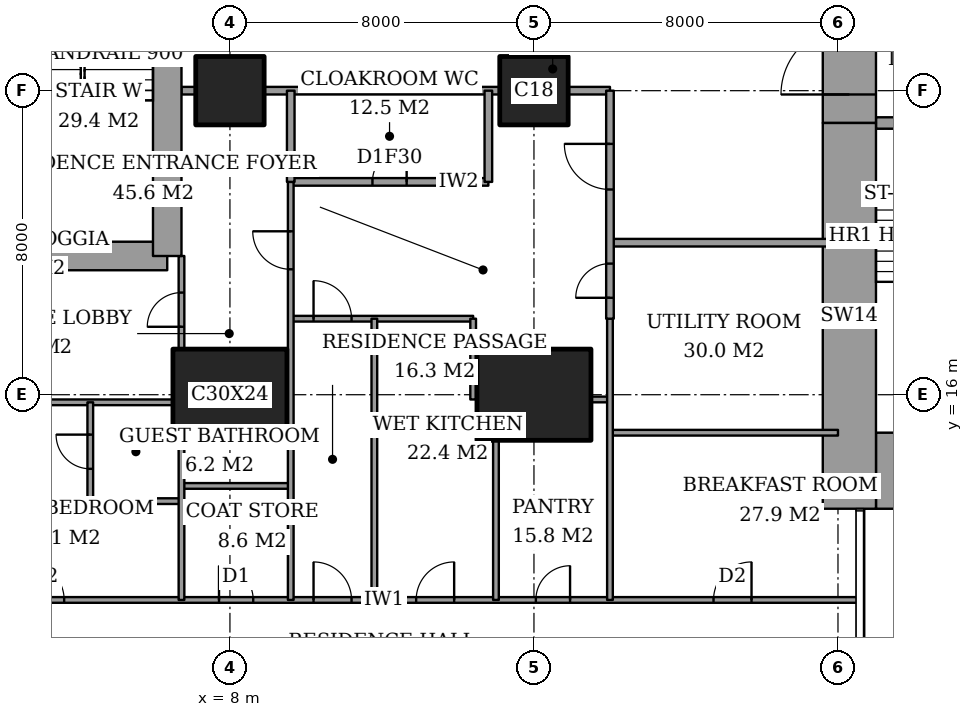
"""IFC4 building model, lengths in metres.
Left out: names, types, materials, properties, quantities, classifications, styles, units other than length and angle.
Written with IfcOpenShell. Run it as: python <this file> out.ifc"""

import sys

from ifc_helpers import new_model, si_unit, direction, frame, frame_2d, origin, origin_2d, place, context, subcontext, project, spatial, rectangle, extrude, element, fill, save


model = new_model("IFC4")
c1 = context("Model", 3, precision=1e-05, world=origin(), true_north=direction((0.0, 1.0)))
c2 = subcontext(c1, "Body", "Model", "MODEL_VIEW")
j1 = project(units=[si_unit("LENGTHUNIT", "METRE"), si_unit("PLANEANGLEUNIT", "RADIAN")], contexts=[c1])
p1 = place(None, origin())
s1 = spatial("IfcSite", under=j1, at=p1, CompositionType="ELEMENT")
p2 = place(p1, origin())
s2 = spatial("IfcBuilding", under=s1, at=p2, CompositionType="ELEMENT")
p3 = place(p2, frame((0.0, 0.0, 185.8)))
s3 = spatial("IfcBuildingStorey", under=s2, at=p3, CompositionType="ELEMENT", Elevation=185.8)
p4 = place(p3, frame((8.0, 16.0, 0.0), z_axis=(0.0, 0.0, 1.0), x_axis=(1.0, 0.0, 0.0)))
e1 = element("IfcColumn", 1, at=p4, inside=s3, PredefinedType="COLUMN", context=c2, shape_type="SweptSolid", body=[
    extrude(rectangle(XDim=3.0, YDim=2.4, at=origin_2d()), origin(), (0.0, 0.0, 1.0), 3.6),
])
p5 = place(p3, frame((8.0, 24.0, 0.0), z_axis=(0.0, 0.0, 1.0), x_axis=(1.0, 0.0, 0.0)))
e2 = element("IfcColumn", 2, at=p5, inside=s3, PredefinedType="COLUMN", context=c2, shape_type="SweptSolid", body=[
    extrude(rectangle(XDim=1.8, YDim=1.8, at=origin_2d()), origin(), (0.0, 0.0, 1.0), 3.6),
])
p6 = place(p3, frame((16.0, 16.0, 0.0), z_axis=(0.0, 0.0, 1.0), x_axis=(1.0, 0.0, 0.0)))
e3 = element("IfcColumn", 3, at=p6, inside=s3, PredefinedType="COLUMN", context=c2, shape_type="SweptSolid", body=[
    extrude(rectangle(XDim=3.0, YDim=2.4, at=origin_2d()), origin(), (0.0, 0.0, 1.0), 3.6),
])
p7 = place(p3, frame((16.0, 24.0, 0.0), z_axis=(0.0, 0.0, 1.0), x_axis=(1.0, 0.0, 0.0)))
e4 = element("IfcColumn", 4, at=p7, inside=s3, PredefinedType="COLUMN", context=c2, shape_type="SweptSolid", body=[
    extrude(rectangle(XDim=1.8, YDim=1.8, at=origin_2d()), origin(), (0.0, 0.0, 1.0), 3.6),
])
p8 = place(p3, frame((25.0, 14.0, 0.0), z_axis=(0.0, 0.0, 1.0), x_axis=(1.0, 0.0, 0.0)))
e5 = element("IfcWall", 5, at=p8, inside=s3, PredefinedType="SHEAR", context=c2, shape_type="SweptSolid", body=[
    extrude(rectangle(XDim=3.15, YDim=2.0, at=frame_2d((1.575, 0.0))), origin(), (0.0, 0.0, 1.0), 3.6),
])
p9 = place(p3, frame((24.3, 13.0, 0.0), z_axis=(0.0, 0.0, 1.0), x_axis=(0.0, 1.0, 0.0)))
e6 = element("IfcWall", 6, at=p9, inside=s3, PredefinedType="SHEAR", context=c2, shape_type="SweptSolid", body=[
    extrude(rectangle(XDim=10.15, YDim=1.4, at=frame_2d((5.075, 0.0))), origin(), (0.0, 0.0, 1.0), 3.6),
])
p10 = place(p3, frame((24.3, 23.15, 0.0), z_axis=(0.0, 0.0, 1.0), x_axis=(0.0, 1.0, 0.0)))
e7 = element("IfcWall", 7, at=p10, inside=s3, PredefinedType="SHEAR", context=c2, shape_type="SweptSolid", body=[
    extrude(rectangle(XDim=11.85, YDim=1.4, at=frame_2d((5.925, 0.0))), origin(), (0.0, 0.0, 1.0), 3.6),
])
p11 = place(p10, frame((0.75, 0.0, 0.0)))
e8 = element("IfcOpeningElement", 8, at=p11, cuts=e7, PredefinedType="OPENING", context=c2, shape_type="SweptSolid", body=[
    extrude(rectangle(XDim=1.8, YDim=2.4, at=frame_2d((0.9, 1.2))), frame((0.0, 0.71, 0.0), z_axis=(0.0, -1.0, 0.0), x_axis=(1.0, 0.0, 0.0)), (0.0, 0.0, 1.0), 1.42),
])
p12 = place(p3, frame((25.0, 23.15, 0.0), z_axis=(0.0, 0.0, 1.0), x_axis=(1.0, 0.0, 0.0)))
e9 = element("IfcWall", 9, at=p12, inside=s3, PredefinedType="SHEAR", context=c2, shape_type="SweptSolid", body=[
    extrude(rectangle(XDim=3.15, YDim=0.3, at=frame_2d((1.575, 0.0))), origin(), (0.0, 0.0, 1.0), 3.6),
])
p13 = place(p12, frame((0.6, 0.0, 0.0)))
e10 = element("IfcOpeningElement", 10, at=p13, cuts=e9, PredefinedType="OPENING", context=c2, shape_type="SweptSolid", body=[
    extrude(rectangle(XDim=1.0, YDim=2.1, at=frame_2d((0.5, 1.05))), frame((0.0, 0.16, 0.0), z_axis=(0.0, -1.0, 0.0), x_axis=(1.0, 0.0, 0.0)), (0.0, 0.0, 1.0), 0.32),
])
p14 = place(p3, frame((1.9, 19.65, 0.0), z_axis=(0.0, 0.0, 1.0), x_axis=(1.0, 0.0, 0.0)))
e11 = element("IfcWall", 11, at=p14, inside=s3, PredefinedType="SHEAR", context=c2, shape_type="SweptSolid", body=[
    extrude(rectangle(XDim=4.45, YDim=0.75, at=frame_2d((2.225, 0.0))), origin(), (0.0, 0.0, 1.0), 3.6),
])
p15 = place(p3, frame((6.35, 19.65, 0.0), z_axis=(0.0, 0.0, 1.0), x_axis=(0.0, 1.0, 0.0)))
e12 = element("IfcWall", 12, at=p15, inside=s3, PredefinedType="SHEAR", context=c2, shape_type="SweptSolid", body=[
    extrude(rectangle(XDim=8.7, YDim=0.75, at=frame_2d((4.35, 0.0))), origin(), (0.0, 0.0, 1.0), 3.6),
])
p16 = place(p15, frame((6.725, 0.0, 0.0)))
e13 = element("IfcOpeningElement", 13, at=p16, cuts=e12, PredefinedType="OPENING", context=c2, shape_type="SweptSolid", body=[
    extrude(rectangle(XDim=1.0, YDim=2.1, at=frame_2d((0.5, 1.05))), frame((0.0, 0.385, 0.0), z_axis=(0.0, -1.0, 0.0), x_axis=(1.0, 0.0, 0.0)), (0.0, 0.0, 1.0), 0.77),
])
p17 = place(p3, frame((-0.45, 10.6, 0.0), z_axis=(0.0, 0.0, 1.0), x_axis=(1.0, 0.0, 0.0)))
e14 = element("IfcWall", 14, at=p17, inside=s3, PredefinedType="PARTITIONING", context=c2, shape_type="SweptSolid", body=[
    extrude(rectangle(XDim=25.011, YDim=0.15, at=frame_2d((12.505, 0.0))), origin(), (0.0, 0.0, 1.0), 3.35),
])
p18 = place(p17, frame((10.65, 0.0, 0.0)))
e15 = element("IfcOpeningElement", 15, at=p18, cuts=e14, PredefinedType="OPENING", context=c2, shape_type="SweptSolid", body=[
    extrude(rectangle(XDim=1.0, YDim=2.1, at=frame_2d((0.5, 1.05))), frame((0.0, 0.085, 0.0), z_axis=(0.0, -1.0, 0.0), x_axis=(1.0, 0.0, 0.0)), (0.0, 0.0, 1.0), 0.17),
])
p19 = place(p17, frame((3.087, 0.0, 0.0)))
e16 = element("IfcOpeningElement", 16, at=p19, cuts=e14, PredefinedType="OPENING", context=c2, shape_type="SweptSolid", body=[
    extrude(rectangle(XDim=1.0, YDim=2.1, at=frame_2d((0.5, 1.05))), frame((0.0, 0.085, 0.0), z_axis=(0.0, -1.0, 0.0), x_axis=(1.0, 0.0, 0.0)), (0.0, 0.0, 1.0), 0.17),
])
p20 = place(p17, frame((8.163, 0.0, 0.0)))
e17 = element("IfcOpeningElement", 17, at=p20, cuts=e14, PredefinedType="OPENING", context=c2, shape_type="SweptSolid", body=[
    extrude(rectangle(XDim=0.9, YDim=2.1, at=frame_2d((0.45, 1.05))), frame((0.0, 0.085, 0.0), z_axis=(0.0, -1.0, 0.0), x_axis=(1.0, 0.0, 0.0)), (0.0, 0.0, 1.0), 0.17),
])
p21 = place(p17, frame((13.35, 0.0, 0.0)))
e18 = element("IfcOpeningElement", 18, at=p21, cuts=e14, PredefinedType="OPENING", context=c2, shape_type="SweptSolid", body=[
    extrude(rectangle(XDim=1.0, YDim=2.1, at=frame_2d((0.5, 1.05))), frame((0.0, 0.085, 0.0), z_axis=(0.0, -1.0, 0.0), x_axis=(1.0, 0.0, 0.0)), (0.0, 0.0, 1.0), 0.17),
])
p22 = place(p17, frame((16.5, 0.0, 0.0)))
e19 = element("IfcOpeningElement", 19, at=p22, cuts=e14, PredefinedType="OPENING", context=c2, shape_type="SweptSolid", body=[
    extrude(rectangle(XDim=0.9, YDim=2.1, at=frame_2d((0.45, 1.05))), frame((0.0, 0.085, 0.0), z_axis=(0.0, -1.0, 0.0), x_axis=(1.0, 0.0, 0.0)), (0.0, 0.0, 1.0), 0.17),
])
p23 = place(p17, frame((21.175, 0.0, 0.0)))
e20 = element("IfcOpeningElement", 20, at=p23, cuts=e14, PredefinedType="OPENING", context=c2, shape_type="SweptSolid", body=[
    extrude(rectangle(XDim=1.0, YDim=2.1, at=frame_2d((0.5, 1.05))), frame((0.0, 0.085, 0.0), z_axis=(0.0, -1.0, 0.0), x_axis=(1.0, 0.0, 0.0)), (0.0, 0.0, 1.0), 0.17),
])
p24 = place(p3, frame((4.325, 13.2, 0.0), z_axis=(0.0, 0.0, 1.0), x_axis=(1.0, 0.0, 0.0)))
e21 = element("IfcWall", 21, at=p24, inside=s3, PredefinedType="PARTITIONING", context=c2, shape_type="SweptSolid", body=[
    extrude(rectangle(XDim=2.4, YDim=0.15, at=frame_2d((1.2, 0.0))), origin(), (0.0, 0.0, 1.0), 3.35),
])
p25 = place(p3, frame((6.725, 13.6, 0.0), z_axis=(0.0, 0.0, 1.0), x_axis=(1.0, 0.0, 0.0)))
e22 = element("IfcWall", 22, at=p25, inside=s3, PredefinedType="PARTITIONING", context=c2, shape_type="SweptSolid", body=[
    extrude(rectangle(XDim=2.875, YDim=0.15, at=frame_2d((1.438, 0.0))), origin(), (0.0, 0.0, 1.0), 3.35),
])
p26 = place(p3, frame((18.0, 15.0, 0.0), z_axis=(0.0, 0.0, 1.0), x_axis=(1.0, 0.0, 0.0)))
e23 = element("IfcWall", 23, at=p26, inside=s3, PredefinedType="PARTITIONING", context=c2, shape_type="SweptSolid", body=[
    extrude(rectangle(XDim=6.0, YDim=0.15, at=frame_2d((3.0, 0.0))), origin(), (0.0, 0.0, 1.0), 3.35),
])
p27 = place(p3, frame((1.25, 15.8, 0.0), z_axis=(0.0, 0.0, 1.0), x_axis=(1.0, 0.0, 0.0)))
e24 = element("IfcWall", 24, at=p27, inside=s3, PredefinedType="PARTITIONING", context=c2, shape_type="SweptSolid", body=[
    extrude(rectangle(XDim=5.25, YDim=0.15, at=frame_2d((2.625, 0.0))), origin(), (0.0, 0.0, 1.0), 3.35),
])
p28 = place(p3, frame((17.5, 15.875, 0.0), z_axis=(0.0, 0.0, 1.0), x_axis=(1.0, 0.0, 0.0)))
e25 = element("IfcWall", 25, at=p28, inside=s3, PredefinedType="PARTITIONING", context=c2, shape_type="SweptSolid", body=[
    extrude(rectangle(XDim=0.5, YDim=0.15, at=frame_2d((0.25, 0.0))), origin(), (0.0, 0.0, 1.0), 2.634),
])
p29 = place(p3, frame((9.6, 18.0, 0.0), z_axis=(0.0, 0.0, 1.0), x_axis=(1.0, 0.0, 0.0)))
e26 = element("IfcWall", 26, at=p29, inside=s3, PredefinedType="PARTITIONING", context=c2, shape_type="SweptSolid", body=[
    extrude(rectangle(XDim=4.8, YDim=0.15, at=frame_2d((2.4, 0.0))), origin(), (0.0, 0.0, 1.0), 3.35),
])
p30 = place(p29, frame((0.6, 0.0, 0.0)))
e27 = element("IfcOpeningElement", 27, at=p30, cuts=e26, PredefinedType="OPENING", context=c2, shape_type="SweptSolid", body=[
    extrude(rectangle(XDim=1.0, YDim=2.1, at=frame_2d((0.5, 1.05))), frame((0.0, 0.085, 0.0), z_axis=(0.0, -1.0, 0.0), x_axis=(1.0, 0.0, 0.0)), (0.0, 0.0, 1.0), 0.17),
])
p31 = place(p3, frame((18.0, 20.0, 0.0), z_axis=(0.0, 0.0, 1.0), x_axis=(1.0, 0.0, 0.0)))
e28 = element("IfcWall", 28, at=p31, inside=s3, PredefinedType="PARTITIONING", context=c2, shape_type="SweptSolid", body=[
    extrude(rectangle(XDim=6.0, YDim=0.2, at=frame_2d((3.0, 0.0))), origin(), (0.0, 0.0, 1.0), 3.35),
])
p32 = place(p3, frame((9.6, 21.6, 0.0), z_axis=(0.0, 0.0, 1.0), x_axis=(1.0, 0.0, 0.0)))
e29 = element("IfcWall", 29, at=p32, inside=s3, PredefinedType="PARTITIONING", context=c2, shape_type="SweptSolid", body=[
    extrude(rectangle(XDim=5.2, YDim=0.2, at=frame_2d((2.6, 0.0))), origin(), (0.0, 0.0, 1.0), 3.35),
])
p33 = place(p32, frame((2.15, 0.0, 0.0)))
e30 = element("IfcOpeningElement", 30, at=p33, cuts=e29, PredefinedType="OPENING", context=c2, shape_type="SweptSolid", body=[
    extrude(rectangle(XDim=0.9, YDim=2.1, at=frame_2d((0.45, 1.05))), frame((0.0, 0.11, 0.0), z_axis=(0.0, -1.0, 0.0), x_axis=(1.0, 0.0, 0.0)), (0.0, 0.0, 1.0), 0.22),
])
p34 = place(p3, frame((6.725, 24.0, 0.0), z_axis=(0.0, 0.0, 1.0), x_axis=(1.0, 0.0, 0.0)))
e31 = element("IfcWall", 31, at=p34, inside=s3, PredefinedType="PARTITIONING", context=c2, shape_type="SweptSolid", body=[
    extrude(rectangle(XDim=0.375, YDim=0.2, at=frame_2d((0.188, 0.0))), origin(), (0.0, 0.0, 1.0), 3.35),
])
p35 = place(p3, frame((8.9, 24.0, 0.0), z_axis=(0.0, 0.0, 1.0), x_axis=(1.0, 0.0, 0.0)))
e32 = element("IfcWall", 32, at=p35, inside=s3, PredefinedType="PARTITIONING", context=c2, shape_type="SweptSolid", body=[
    extrude(rectangle(XDim=6.2, YDim=0.2, at=frame_2d((3.1, 0.0))), origin(), (0.0, 0.0, 1.0), 3.35),
])
p36 = place(p3, frame((16.9, 24.0, 0.0), z_axis=(0.0, 0.0, 1.0), x_axis=(1.0, 0.0, 0.0)))
e33 = element("IfcWall", 33, at=p36, inside=s3, PredefinedType="PARTITIONING", context=c2, shape_type="SweptSolid", body=[
    extrude(rectangle(XDim=1.1, YDim=0.2, at=frame_2d((0.55, 0.0))), origin(), (0.0, 0.0, 1.0), 3.35),
])
p37 = place(p3, frame((4.325, 13.2, 0.0), z_axis=(0.0, 0.0, 1.0), x_axis=(0.0, 1.0, 0.0)))
e34 = element("IfcWall", 34, at=p37, inside=s3, PredefinedType="PARTITIONING", context=c2, shape_type="SweptSolid", body=[
    extrude(rectangle(XDim=2.6, YDim=0.15, at=frame_2d((1.3, 0.0))), origin(), (0.0, 0.0, 1.0), 3.35),
])
p38 = place(p37, frame((0.85, 0.0, 0.0)))
e35 = element("IfcOpeningElement", 35, at=p38, cuts=e34, PredefinedType="OPENING", context=c2, shape_type="SweptSolid", body=[
    extrude(rectangle(XDim=0.9, YDim=2.1, at=frame_2d((0.45, 1.05))), frame((0.0, 0.085, 0.0), z_axis=(0.0, -1.0, 0.0), x_axis=(1.0, 0.0, 0.0)), (0.0, 0.0, 1.0), 0.17),
])
p39 = place(p3, frame((6.725, 10.6, 0.0), z_axis=(0.0, 0.0, 1.0), x_axis=(0.0, 1.0, 0.0)))
e36 = element("IfcWall", 36, at=p39, inside=s3, PredefinedType="PARTITIONING", context=c2, shape_type="SweptSolid", body=[
    extrude(rectangle(XDim=4.2, YDim=0.15, at=frame_2d((2.1, 0.0))), origin(), (0.0, 0.0, 1.0), 3.35),
])
p40 = place(p3, frame((6.725, 17.2, 0.0), z_axis=(0.0, 0.0, 1.0), x_axis=(0.0, 1.0, 0.0)))
e37 = element("IfcWall", 37, at=p40, inside=s3, PredefinedType="PARTITIONING", context=c2, shape_type="SweptSolid", body=[
    extrude(rectangle(XDim=2.45, YDim=0.15, at=frame_2d((1.225, 0.0))), origin(), (0.0, 0.0, 1.0), 3.35),
])
p41 = place(p40, frame((0.587, 0.0, 0.0)))
e38 = element("IfcOpeningElement", 38, at=p41, cuts=e37, PredefinedType="OPENING", context=c2, shape_type="SweptSolid", body=[
    extrude(rectangle(XDim=0.9, YDim=2.1, at=frame_2d((0.45, 1.05))), frame((0.0, 0.085, 0.0), z_axis=(0.0, -1.0, 0.0), x_axis=(1.0, 0.0, 0.0)), (0.0, 0.0, 1.0), 0.17),
])
p42 = place(p3, frame((9.6, 21.6, 0.0), z_axis=(0.0, 0.0, 1.0), x_axis=(0.0, 1.0, 0.0)))
e39 = element("IfcWall", 39, at=p42, inside=s3, PredefinedType="PARTITIONING", context=c2, shape_type="SweptSolid", body=[
    extrude(rectangle(XDim=2.4, YDim=0.2, at=frame_2d((1.2, 0.0))), origin(), (0.0, 0.0, 1.0), 3.35),
])
p43 = place(p3, frame((9.6, 10.6, 0.0), z_axis=(0.0, 0.0, 1.0), x_axis=(0.0, 1.0, 0.0)))
e40 = element("IfcWall", 40, at=p43, inside=s3, PredefinedType="PARTITIONING", context=c2, shape_type="SweptSolid", body=[
    extrude(rectangle(XDim=11.0, YDim=0.15, at=frame_2d((5.5, 0.0))), origin(), (0.0, 0.0, 1.0), 3.35),
])
p44 = place(p43, frame((8.7, 0.0, 0.0)))
e41 = element("IfcOpeningElement", 41, at=p44, cuts=e40, PredefinedType="OPENING", context=c2, shape_type="SweptSolid", body=[
    extrude(rectangle(XDim=1.0, YDim=2.1, at=frame_2d((0.5, 1.05))), frame((0.0, 0.085, 0.0), z_axis=(0.0, -1.0, 0.0), x_axis=(1.0, 0.0, 0.0)), (0.0, 0.0, 1.0), 0.17),
])
p45 = place(p3, frame((11.8, 10.6, 0.0), z_axis=(0.0, 0.0, 1.0), x_axis=(0.0, 1.0, 0.0)))
e42 = element("IfcWall", 42, at=p45, inside=s3, PredefinedType="PARTITIONING", context=c2, shape_type="SweptSolid", body=[
    extrude(rectangle(XDim=7.4, YDim=0.15, at=frame_2d((3.7, 0.0))), origin(), (0.0, 0.0, 1.0), 3.35),
])
p46 = place(p3, frame((14.4, 15.875, 0.0), z_axis=(0.0, 0.0, 1.0), x_axis=(0.0, 1.0, 0.0)))
e43 = element("IfcWall", 43, at=p46, inside=s3, PredefinedType="PARTITIONING", context=c2, shape_type="SweptSolid", body=[
    extrude(rectangle(XDim=2.125, YDim=0.15, at=frame_2d((1.062, 0.0))), origin(), (0.0, 0.0, 1.0), 3.35),
])
p47 = place(p3, frame((14.8, 21.6, 0.0), z_axis=(0.0, 0.0, 1.0), x_axis=(0.0, 1.0, 0.0)))
e44 = element("IfcWall", 44, at=p47, inside=s3, PredefinedType="PARTITIONING", context=c2, shape_type="SweptSolid", body=[
    extrude(rectangle(XDim=2.4, YDim=0.2, at=frame_2d((1.2, 0.0))), origin(), (0.0, 0.0, 1.0), 3.35),
])
p48 = place(p3, frame((15.0, 10.6, 0.0), z_axis=(0.0, 0.0, 1.0), x_axis=(0.0, 1.0, 0.0)))
e45 = element("IfcWall", 45, at=p48, inside=s3, PredefinedType="PARTITIONING", context=c2, shape_type="SweptSolid", body=[
    extrude(rectangle(XDim=4.2, YDim=0.15, at=frame_2d((2.1, 0.0))), origin(), (0.0, 0.0, 1.0), 3.35),
])
p49 = place(p3, frame((18.0, 18.0, 0.0), z_axis=(0.0, 0.0, 1.0), x_axis=(0.0, 1.0, 0.0)))
e46 = element("IfcWall", 46, at=p49, inside=s3, PredefinedType="PARTITIONING", context=c2, shape_type="SweptSolid", body=[
    extrude(rectangle(XDim=6.0, YDim=0.2, at=frame_2d((3.0, 0.0))), origin(), (0.0, 0.0, 1.0), 3.35),
])
p50 = place(p49, frame((3.4, 0.0, 0.0)))
e47 = element("IfcOpeningElement", 47, at=p50, cuts=e46, PredefinedType="OPENING", context=c2, shape_type="SweptSolid", body=[
    extrude(rectangle(XDim=1.2, YDim=2.4, at=frame_2d((0.6, 1.2))), frame((0.0, 0.11, 0.0), z_axis=(0.0, -1.0, 0.0), x_axis=(1.0, 0.0, 0.0)), (0.0, 0.0, 1.0), 0.22),
])
p51 = place(p49, frame((0.55, 0.0, 0.0)))
e48 = element("IfcOpeningElement", 48, at=p51, cuts=e46, PredefinedType="OPENING", context=c2, shape_type="SweptSolid", body=[
    extrude(rectangle(XDim=0.9, YDim=2.1, at=frame_2d((0.45, 1.05))), frame((0.0, 0.11, 0.0), z_axis=(0.0, -1.0, 0.0), x_axis=(1.0, 0.0, 0.0)), (0.0, 0.0, 1.0), 0.22),
])
p52 = place(p3, frame((18.0, 10.6, 0.0), z_axis=(0.0, 0.0, 1.0), x_axis=(0.0, 1.0, 0.0)))
e49 = element("IfcWall", 49, at=p52, inside=s3, PredefinedType="PARTITIONING", context=c2, shape_type="SweptSolid", body=[
    extrude(rectangle(XDim=7.4, YDim=0.15, at=frame_2d((3.7, 0.0))), origin(), (0.0, 0.0, 1.0), 3.35),
])
p53 = place(p18, origin())
e50 = element("IfcDoor", 50, at=p53, inside=s3, OperationType="SINGLE_SWING_RIGHT", PredefinedType="DOOR", context=c2, shape_type="SweptSolid", body=[
    extrude(rectangle(XDim=1.0, YDim=2.1, at=frame_2d((0.5, 1.05))), frame((0.0, 0.025, 0.0), z_axis=(0.0, -1.0, 0.0), x_axis=(1.0, 0.0, 0.0)), (0.0, 0.0, 1.0), 0.05),
])
fill(e15, e50)
p54 = place(p38, origin())
e51 = element("IfcDoor", 51, at=p54, inside=s3, OperationType="SINGLE_SWING_LEFT", PredefinedType="DOOR", context=c2, shape_type="SweptSolid", body=[
    extrude(rectangle(XDim=0.9, YDim=2.1, at=frame_2d((0.45, 1.05))), frame((0.0, 0.025, 0.0), z_axis=(0.0, -1.0, 0.0), x_axis=(1.0, 0.0, 0.0)), (0.0, 0.0, 1.0), 0.05),
])
fill(e35, e51)
p55 = place(p19, origin())
e52 = element("IfcDoor", 52, at=p55, inside=s3, OperationType="SINGLE_SWING_RIGHT", PredefinedType="DOOR", context=c2, shape_type="SweptSolid", body=[
    extrude(rectangle(XDim=1.0, YDim=2.1, at=frame_2d((0.5, 1.05))), frame((0.0, 0.025, 0.0), z_axis=(0.0, -1.0, 0.0), x_axis=(1.0, 0.0, 0.0)), (0.0, 0.0, 1.0), 0.05),
])
fill(e16, e52)
p56 = place(p41, origin())
e53 = element("IfcDoor", 53, at=p56, inside=s3, OperationType="SINGLE_SWING_RIGHT", PredefinedType="DOOR", context=c2, shape_type="SweptSolid", body=[
    extrude(rectangle(XDim=0.9, YDim=2.1, at=frame_2d((0.45, 1.05))), frame((0.0, 0.025, 0.0), z_axis=(0.0, -1.0, 0.0), x_axis=(1.0, 0.0, 0.0)), (0.0, 0.0, 1.0), 0.05),
])
fill(e38, e53)
p57 = place(p20, origin())
e54 = element("IfcDoor", 54, at=p57, inside=s3, OperationType="SINGLE_SWING_RIGHT", PredefinedType="DOOR", context=c2, shape_type="SweptSolid", body=[
    extrude(rectangle(XDim=0.9, YDim=2.1, at=frame_2d((0.45, 1.05))), frame((0.0, 0.025, 0.0), z_axis=(0.0, -1.0, 0.0), x_axis=(1.0, 0.0, 0.0)), (0.0, 0.0, 1.0), 0.05),
])
fill(e17, e54)
p58 = place(p44, origin())
e55 = element("IfcDoor", 55, at=p58, inside=s3, OperationType="SINGLE_SWING_LEFT", PredefinedType="DOOR", context=c2, shape_type="SweptSolid", body=[
    extrude(rectangle(XDim=1.0, YDim=2.1, at=frame_2d((0.5, 1.05))), frame((0.0, 0.025, 0.0), z_axis=(0.0, -1.0, 0.0), x_axis=(1.0, 0.0, 0.0)), (0.0, 0.0, 1.0), 0.05),
])
fill(e41, e55)
p59 = place(p33, origin())
e56 = element("IfcDoor", 56, at=p59, inside=s3, OperationType="SINGLE_SWING_LEFT", PredefinedType="DOOR", context=c2, shape_type="SweptSolid", body=[
    extrude(rectangle(XDim=0.9, YDim=2.1, at=frame_2d((0.45, 1.05))), frame((0.0, 0.025, 0.0), z_axis=(0.0, -1.0, 0.0), x_axis=(1.0, 0.0, 0.0)), (0.0, 0.0, 1.0), 0.05),
])
fill(e30, e56)
p60 = place(p50, origin())
e57 = element("IfcDoor", 57, at=p60, inside=s3, OperationType="SINGLE_SWING_LEFT", PredefinedType="DOOR", context=c2, shape_type="SweptSolid", body=[
    extrude(rectangle(XDim=1.2, YDim=2.4, at=frame_2d((0.6, 1.2))), frame((0.0, 0.025, 0.0), z_axis=(0.0, -1.0, 0.0), x_axis=(1.0, 0.0, 0.0)), (0.0, 0.0, 1.0), 0.05),
])
fill(e47, e57)
p61 = place(p30, origin())
e58 = element("IfcDoor", 58, at=p61, inside=s3, OperationType="SINGLE_SWING_RIGHT", PredefinedType="DOOR", context=c2, shape_type="SweptSolid", body=[
    extrude(rectangle(XDim=1.0, YDim=2.1, at=frame_2d((0.5, 1.05))), frame((0.0, 0.025, 0.0), z_axis=(0.0, -1.0, 0.0), x_axis=(1.0, 0.0, 0.0)), (0.0, 0.0, 1.0), 0.05),
])
fill(e27, e58)
p62 = place(p21, origin())
e59 = element("IfcDoor", 59, at=p62, inside=s3, OperationType="SINGLE_SWING_LEFT", PredefinedType="DOOR", context=c2, shape_type="SweptSolid", body=[
    extrude(rectangle(XDim=1.0, YDim=2.1, at=frame_2d((0.5, 1.05))), frame((0.0, 0.025, 0.0), z_axis=(0.0, -1.0, 0.0), x_axis=(1.0, 0.0, 0.0)), (0.0, 0.0, 1.0), 0.05),
])
fill(e18, e59)
p63 = place(p22, origin())
e60 = element("IfcDoor", 60, at=p63, inside=s3, OperationType="SINGLE_SWING_LEFT", PredefinedType="DOOR", context=c2, shape_type="SweptSolid", body=[
    extrude(rectangle(XDim=0.9, YDim=2.1, at=frame_2d((0.45, 1.05))), frame((0.0, 0.025, 0.0), z_axis=(0.0, -1.0, 0.0), x_axis=(1.0, 0.0, 0.0)), (0.0, 0.0, 1.0), 0.05),
])
fill(e19, e60)
p64 = place(p23, origin())
e61 = element("IfcDoor", 61, at=p64, inside=s3, OperationType="SINGLE_SWING_LEFT", PredefinedType="DOOR", context=c2, shape_type="SweptSolid", body=[
    extrude(rectangle(XDim=1.0, YDim=2.1, at=frame_2d((0.5, 1.05))), frame((0.0, 0.025, 0.0), z_axis=(0.0, -1.0, 0.0), x_axis=(1.0, 0.0, 0.0)), (0.0, 0.0, 1.0), 0.05),
])
fill(e20, e61)
p65 = place(p51, origin())
e62 = element("IfcDoor", 62, at=p65, inside=s3, OperationType="SINGLE_SWING_RIGHT", PredefinedType="DOOR", context=c2, shape_type="SweptSolid", body=[
    extrude(rectangle(XDim=0.9, YDim=2.1, at=frame_2d((0.45, 1.05))), frame((0.0, 0.025, 0.0), z_axis=(0.0, -1.0, 0.0), x_axis=(1.0, 0.0, 0.0)), (0.0, 0.0, 1.0), 0.05),
])
fill(e48, e62)
p66 = place(p11, origin())
e63 = element("IfcDoor", 63, at=p66, inside=s3, OperationType="DOUBLE_DOOR_DOUBLE_SWING", PredefinedType="DOOR", context=c2, shape_type="SweptSolid", body=[
    extrude(rectangle(XDim=1.8, YDim=2.4, at=frame_2d((0.9, 1.2))), frame((0.0, 0.025, 0.0), z_axis=(0.0, -1.0, 0.0), x_axis=(1.0, 0.0, 0.0)), (0.0, 0.0, 1.0), 0.05),
])
fill(e8, e63)
save(model, sys.argv[1])
